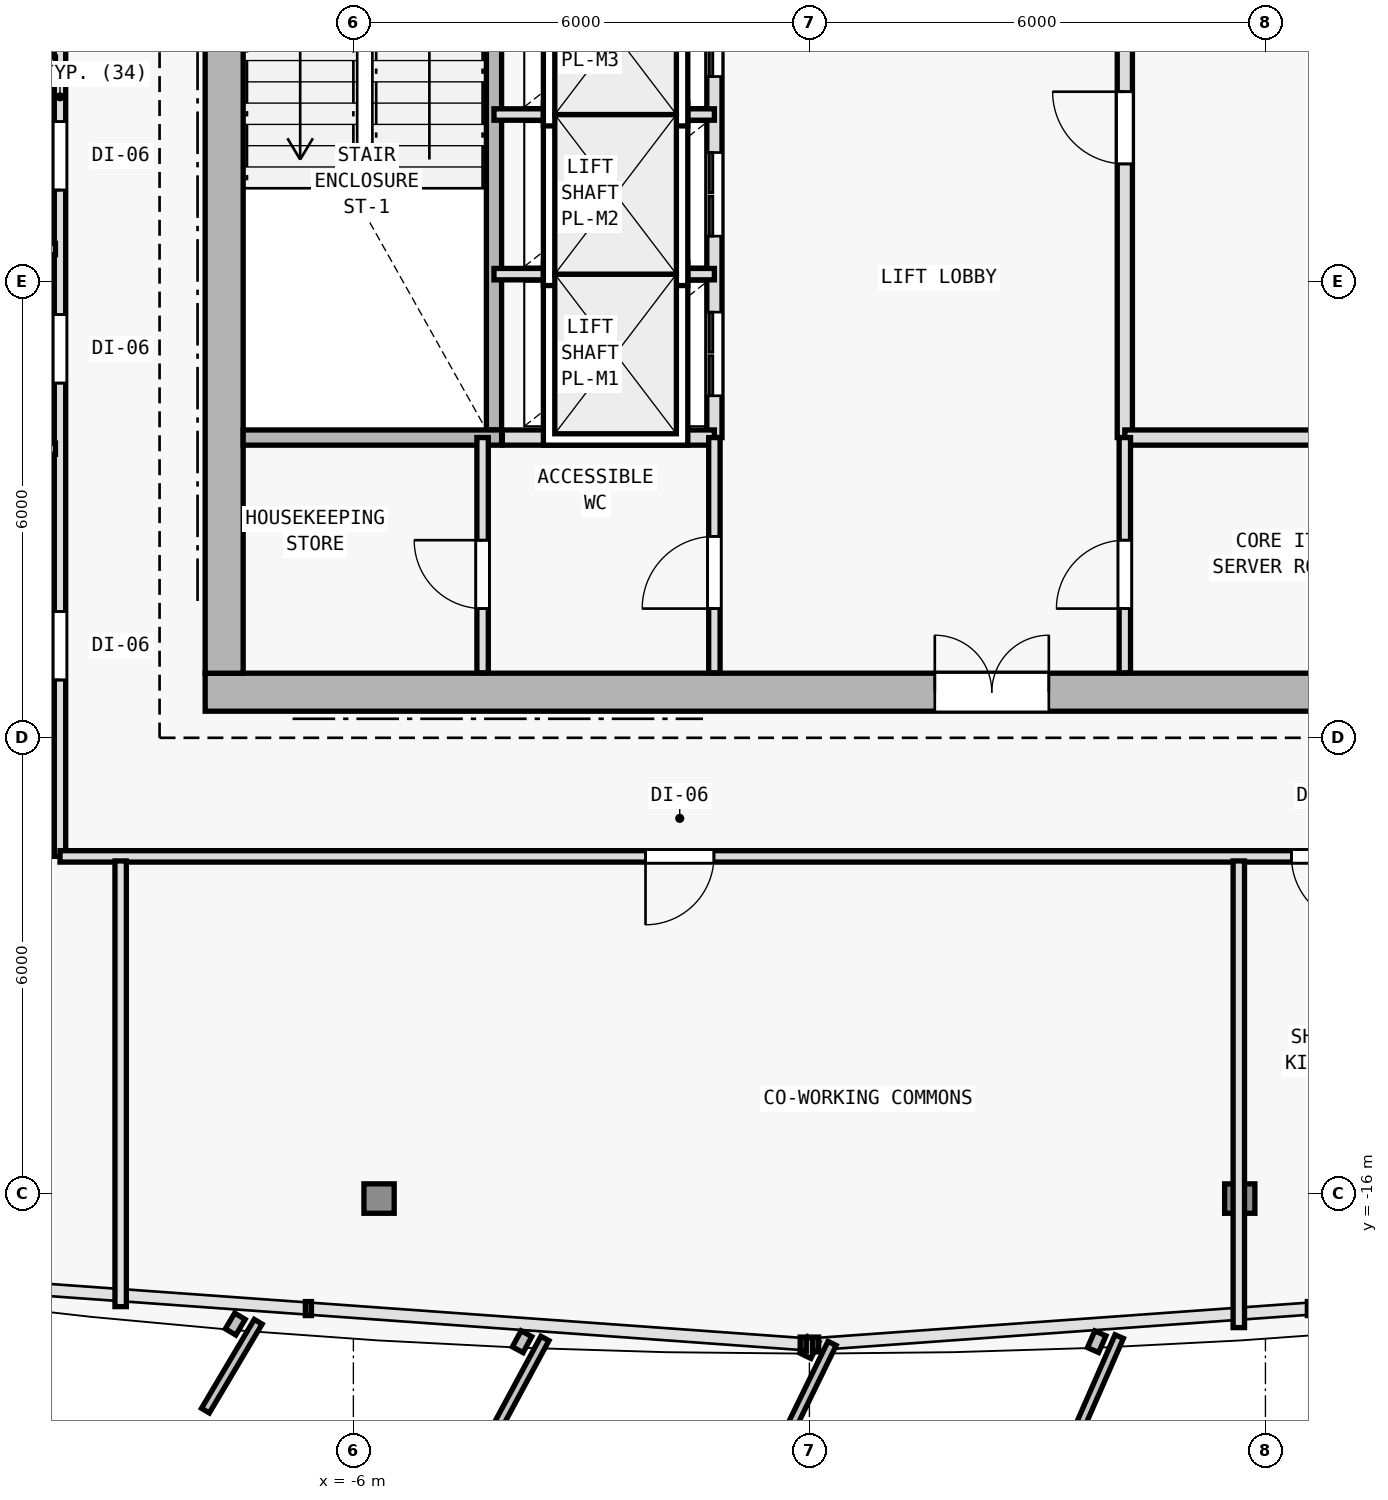
"""IFC4 building model, lengths in metres.
Left out: names, types, materials, properties, quantities, classifications, styles, units other than length and angle.
Written with IfcOpenShell. Run it as: python <this file> out.ifc"""

import sys

from ifc_helpers import new_model, si_unit, direction, frame, frame_2d, origin, origin_2d, place, context, subcontext, project, spatial, rectangle, i_section, extrude, element, fill, save


model = new_model("IFC4")
c1 = context("Model", 3, precision=1e-05, world=origin(), true_north=direction((0.0, 1.0)))
c2 = subcontext(c1, "Body", "Model", "MODEL_VIEW")
j1 = project(units=[si_unit("LENGTHUNIT", "METRE"), si_unit("PLANEANGLEUNIT", "RADIAN")], contexts=[c1])
p1 = place(None, origin())
s1 = spatial("IfcSite", under=j1, at=p1, CompositionType="ELEMENT")
p2 = place(p1, origin())
s2 = spatial("IfcBuilding", under=s1, at=p2, CompositionType="ELEMENT")
p3 = place(p2, frame((0.0, 0.0, 201.9)))
s3 = spatial("IfcBuildingStorey", under=s2, at=p3, CompositionType="ELEMENT", Elevation=201.9)
for number, where, z_axis, x_axis in (
    (1, (-7.7, -9.4, 0.0), (0.0, 0.0, 1.0), (1.0, 0.0, 0.0)),
    (2, (0.0, -9.4, 0.0), (0.0, 0.0, 1.0), (1.0, 0.0, 0.0)),
):
    element("IfcColumn", number, at=place(p3, frame(where, z_axis=z_axis, x_axis=x_axis)), inside=s3, PredefinedType="COLUMN", context=c2, shape_type="SweptSolid", body=[
        extrude(i_section(OverallWidth=0.398, OverallDepth=0.387, WebThickness=0.013, FlangeThickness=0.022, FilletRadius=0.015, at=origin_2d()), origin(), (0.0, 0.0, 1.0), 3.6),
    ])
for number, where, z_axis, x_axis in (
    (3, (-5.662, -16.062, 0.006), (0.007, 0.035, 0.999), (-0.981, 0.193, 0.0)),
    (4, (5.662, -16.062, 0.006), (-0.007, 0.035, 0.999), (-0.981, -0.193, 0.0)),
):
    element("IfcColumn", number, at=place(p3, frame(where, z_axis=z_axis, x_axis=x_axis)), inside=s3, PredefinedType="COLUMN", context=c2, shape_type="SweptSolid", body=[
        extrude(i_section(OverallWidth=0.398, OverallDepth=0.387, WebThickness=0.013, FlangeThickness=0.022, FilletRadius=0.015, at=origin_2d()), origin(), (0.0, 0.0, 1.0), 3.591),
    ])
p4 = place(p3, frame((-7.95, -9.4, 0.0), z_axis=(0.0, 0.0, 1.0), x_axis=(1.0, 0.0, 0.0)))
e5 = element("IfcWall", 5, at=p4, inside=s3, PredefinedType="SHEAR", context=c2, shape_type="SweptSolid", body=[
    extrude(rectangle(XDim=15.9, YDim=0.5, at=frame_2d((7.95, 0.0))), origin(), (0.0, 0.0, 1.0), 3.35),
])
p5 = place(p4, frame((9.6, 0.0, 0.0)))
e6 = element("IfcOpeningElement", 6, at=p5, cuts=e5, PredefinedType="OPENING", context=c2, shape_type="SweptSolid", body=[
    extrude(rectangle(XDim=1.5, YDim=2.2, at=frame_2d((0.75, 1.1))), frame((0.0, 0.26, 0.0), z_axis=(0.0, -1.0, 0.0), x_axis=(1.0, 0.0, 0.0)), (0.0, 0.0, 1.0), 0.52),
])
p6 = place(p3, frame((-7.7, -9.15, 0.0), z_axis=(0.0, 0.0, 1.0), x_axis=(0.0, 1.0, 0.0)))
e7 = element("IfcWall", 7, at=p6, inside=s3, PredefinedType="SHEAR", context=c2, shape_type="SweptSolid", body=[
    extrude(rectangle(XDim=19.1, YDim=0.5, at=frame_2d((9.55, 0.0))), origin(), (0.0, 0.0, 1.0), 3.35),
])
p7 = place(p6, frame((12.7, 0.0, 0.0)))
e8 = element("IfcOpeningElement", 8, at=p7, cuts=e7, PredefinedType="OPENING", context=c2, shape_type="SweptSolid", body=[
    extrude(rectangle(XDim=1.1, YDim=2.15, at=frame_2d((0.55, 1.075))), frame((0.0, 0.26, 0.0), z_axis=(0.0, -1.0, 0.0), x_axis=(1.0, 0.0, 0.0)), (0.0, 0.0, 1.0), 0.52),
])
p8 = place(p3, frame((-4.15, -5.95, 0.0), z_axis=(0.0, 0.0, 1.0), x_axis=(0.0, 1.0, 0.0)))
e9 = element("IfcWall", 9, at=p8, inside=s3, PredefinedType="SOLIDWALL", context=c2, shape_type="SweptSolid", body=[
    extrude(rectangle(XDim=7.2, YDim=0.2, at=frame_2d((3.6, 0.0))), origin(), (0.0, 0.0, 1.0), 3.35),
])
p9 = place(p3, frame((4.15, -6.05, 0.0), z_axis=(0.0, 0.0, 1.0), x_axis=(0.0, 1.0, 0.0)))
e10 = element("IfcWall", 10, at=p9, inside=s3, PredefinedType="SOLIDWALL", context=c2, shape_type="SweptSolid", body=[
    extrude(rectangle(XDim=8.7, YDim=0.2, at=frame_2d((4.35, 0.0))), origin(), (0.0, 0.0, 1.0), 3.35),
])
p10 = place(p9, frame((3.6, 0.0, 0.0)))
e11 = element("IfcOpeningElement", 11, at=p10, cuts=e10, PredefinedType="OPENING", context=c2, shape_type="SweptSolid", body=[
    extrude(rectangle(XDim=0.95, YDim=2.1, at=frame_2d((0.475, 1.05))), frame((0.0, 0.11, 0.0), z_axis=(0.0, -1.0, 0.0), x_axis=(1.0, 0.0, 0.0)), (0.0, 0.0, 1.0), 0.22),
])
p11 = place(p3, frame((-1.25, -6.05, 0.0), z_axis=(0.0, 0.0, 1.0), x_axis=(0.0, 1.0, 0.0)))
e12 = element("IfcWall", 12, at=p11, inside=s3, PredefinedType="SOLIDWALL", context=c2, shape_type="SweptSolid", body=[
    extrude(rectangle(XDim=8.7, YDim=0.2, at=frame_2d((4.35, 0.0))), origin(), (0.0, 0.0, 1.0), 3.35),
])
p12 = place(p11, frame((0.55, 0.0, 0.0)))
e13 = element("IfcOpeningElement", 13, at=p12, cuts=e12, PredefinedType="OPENING", context=c2, shape_type="SweptSolid", body=[
    extrude(rectangle(XDim=1.1, YDim=2.15, at=frame_2d((0.55, 1.075))), frame((0.0, 0.11, 0.0), z_axis=(0.0, -1.0, 0.0), x_axis=(1.0, 0.0, 0.0)), (0.0, 0.0, 1.0), 0.22),
])
p13 = place(p11, frame((2.65, 0.0, 0.0)))
e14 = element("IfcOpeningElement", 14, at=p13, cuts=e12, PredefinedType="OPENING", context=c2, shape_type="SweptSolid", body=[
    extrude(rectangle(XDim=1.1, YDim=2.15, at=frame_2d((0.55, 1.075))), frame((0.0, 0.11, 0.0), z_axis=(0.0, -1.0, 0.0), x_axis=(1.0, 0.0, 0.0)), (0.0, 0.0, 1.0), 0.22),
])
p14 = place(p11, frame((4.75, 0.0, 0.0)))
e15 = element("IfcOpeningElement", 15, at=p14, cuts=e12, PredefinedType="OPENING", context=c2, shape_type="SweptSolid", body=[
    extrude(rectangle(XDim=1.1, YDim=2.15, at=frame_2d((0.55, 1.075))), frame((0.0, 0.11, 0.0), z_axis=(0.0, -1.0, 0.0), x_axis=(1.0, 0.0, 0.0)), (0.0, 0.0, 1.0), 0.22),
])
p15 = place(p11, frame((6.85, 0.0, 0.0)))
e16 = element("IfcOpeningElement", 16, at=p15, cuts=e12, PredefinedType="OPENING", context=c2, shape_type="SweptSolid", body=[
    extrude(rectangle(XDim=1.1, YDim=2.15, at=frame_2d((0.55, 1.075))), frame((0.0, 0.11, 0.0), z_axis=(0.0, -1.0, 0.0), x_axis=(1.0, 0.0, 0.0)), (0.0, 0.0, 1.0), 0.22),
])
for number, where, z_axis, x_axis in (
    (17, (-4.15, -3.9, 0.0), (0.0, 0.0, 1.0), (1.0, 0.0, 0.0)),
    (18, (-4.15, -1.8, 0.0), (0.0, 0.0, 1.0), (1.0, 0.0, 0.0)),
):
    element("IfcWall", number, at=place(p3, frame(where, z_axis=z_axis, x_axis=x_axis)), inside=s3, PredefinedType="PARTITIONING", context=c2, shape_type="SweptSolid", body=[
        extrude(rectangle(XDim=2.9, YDim=0.15, at=frame_2d((1.45, 0.0))), origin(), (0.0, 0.0, 1.0), 3.35),
    ])
p16 = place(p3, frame((-7.45, -6.05, 0.0), z_axis=(0.0, 0.0, 1.0), x_axis=(1.0, 0.0, 0.0)))
e19 = element("IfcWall", 19, at=p16, inside=s3, PredefinedType="SOLIDWALL", context=c2, shape_type="SweptSolid", body=[
    extrude(rectangle(XDim=3.4, YDim=0.2, at=frame_2d((1.7, 0.0))), origin(), (0.0, 0.0, 1.0), 3.35),
])
p17 = place(p3, frame((-4.04, -6.05, 0.0), z_axis=(0.0, 0.0, 1.0), x_axis=(1.0, 0.0, 0.0)))
e20 = element("IfcWall", 20, at=p17, inside=s3, PredefinedType="SOLIDWALL", context=c2, shape_type="SweptSolid", body=[
    extrude(rectangle(XDim=2.79, YDim=0.2, at=frame_2d((1.395, 0.0))), origin(), (0.0, 0.0, 1.0), 3.35),
])
p18 = place(p3, frame((4.15, -6.05, 0.0), z_axis=(0.0, 0.0, 1.0), x_axis=(1.0, 0.0, 0.0)))
e21 = element("IfcWall", 21, at=p18, inside=s3, PredefinedType="SOLIDWALL", context=c2, shape_type="SweptSolid", body=[
    extrude(rectangle(XDim=3.295, YDim=0.2, at=frame_2d((1.647, 0.0))), origin(), (0.0, 0.0, 1.0), 3.35),
])
p19 = place(p3, frame((-1.25, -9.145, 0.0), z_axis=(0.0, 0.0, 1.0), x_axis=(0.0, 1.0, 0.0)))
e22 = element("IfcWall", 22, at=p19, inside=s3, PredefinedType="PARTITIONING", context=c2, shape_type="SweptSolid", body=[
    extrude(rectangle(XDim=3.095, YDim=0.15, at=frame_2d((1.547, 0.0))), origin(), (0.0, 0.0, 1.0), 3.35),
])
p20 = place(p19, frame((0.845, 0.0, 0.0)))
e23 = element("IfcOpeningElement", 23, at=p20, cuts=e22, PredefinedType="OPENING", context=c2, shape_type="SweptSolid", body=[
    extrude(rectangle(XDim=0.95, YDim=2.1, at=frame_2d((0.475, 1.05))), frame((0.0, 0.085, 0.0), z_axis=(0.0, -1.0, 0.0), x_axis=(1.0, 0.0, 0.0)), (0.0, 0.0, 1.0), 0.17),
])
p21 = place(p3, frame((4.15, -9.145, 0.0), z_axis=(0.0, 0.0, 1.0), x_axis=(0.0, 1.0, 0.0)))
e24 = element("IfcWall", 24, at=p21, inside=s3, PredefinedType="PARTITIONING", context=c2, shape_type="SweptSolid", body=[
    extrude(rectangle(XDim=3.095, YDim=0.15, at=frame_2d((1.547, 0.0))), origin(), (0.0, 0.0, 1.0), 3.35),
])
p22 = place(p21, frame((0.845, 0.0, 0.0)))
e25 = element("IfcOpeningElement", 25, at=p22, cuts=e24, PredefinedType="OPENING", context=c2, shape_type="SweptSolid", body=[
    extrude(rectangle(XDim=0.9, YDim=2.1, at=frame_2d((0.45, 1.05))), frame((0.0, 0.085, 0.0), z_axis=(0.0, -1.0, 0.0), x_axis=(1.0, 0.0, 0.0)), (0.0, 0.0, 1.0), 0.17),
])
p23 = place(p3, frame((-4.3, -9.145, 0.0), z_axis=(0.0, 0.0, 1.0), x_axis=(0.0, 1.0, 0.0)))
e26 = element("IfcWall", 26, at=p23, inside=s3, PredefinedType="PARTITIONING", context=c2, shape_type="SweptSolid", body=[
    extrude(rectangle(XDim=3.095, YDim=0.15, at=frame_2d((1.547, 0.0))), origin(), (0.0, 0.0, 1.0), 3.35),
])
p24 = place(p23, frame((0.845, 0.0, 0.0)))
e27 = element("IfcOpeningElement", 27, at=p24, cuts=e26, PredefinedType="OPENING", context=c2, shape_type="SweptSolid", body=[
    extrude(rectangle(XDim=0.9, YDim=2.1, at=frame_2d((0.45, 1.05))), frame((0.0, 0.085, 0.0), z_axis=(0.0, -1.0, 0.0), x_axis=(1.0, 0.0, 0.0)), (0.0, 0.0, 1.0), 0.17),
])
p25 = place(p3, frame((-9.86, -11.56, 0.0), z_axis=(0.0, 0.0, 1.0), x_axis=(0.0, 1.0, 0.0)))
e28 = element("IfcWall", 28, at=p25, inside=s3, PredefinedType="PARTITIONING", context=c2, shape_type="SweptSolid", body=[
    extrude(rectangle(XDim=19.986, YDim=0.15, at=frame_2d((9.993, 0.0))), origin(), (0.0, 0.0, 1.0), 2.775),
])
p26 = place(p25, frame((11.041, 0.0, 0.0)))
e29 = element("IfcOpeningElement", 29, at=p26, cuts=e28, PredefinedType="OPENING", context=c2, shape_type="SweptSolid", body=[
    extrude(rectangle(XDim=0.9, YDim=2.1, at=frame_2d((0.45, 1.05))), frame((0.0, 0.085, 0.0), z_axis=(0.0, -1.0, 0.0), x_axis=(1.0, 0.0, 0.0)), (0.0, 0.0, 1.0), 0.17),
])
p27 = place(p25, frame((8.766, 0.0, 0.0)))
e30 = element("IfcOpeningElement", 30, at=p27, cuts=e28, PredefinedType="OPENING", context=c2, shape_type="SweptSolid", body=[
    extrude(rectangle(XDim=0.9, YDim=2.1, at=frame_2d((0.45, 1.05))), frame((0.0, 0.085, 0.0), z_axis=(0.0, -1.0, 0.0), x_axis=(1.0, 0.0, 0.0)), (0.0, 0.0, 1.0), 0.17),
])
p28 = place(p25, frame((6.227, 0.0, 0.0)))
e31 = element("IfcOpeningElement", 31, at=p28, cuts=e28, PredefinedType="OPENING", context=c2, shape_type="SweptSolid", body=[
    extrude(rectangle(XDim=0.9, YDim=2.1, at=frame_2d((0.45, 1.05))), frame((0.0, 0.085, 0.0), z_axis=(0.0, -1.0, 0.0), x_axis=(1.0, 0.0, 0.0)), (0.0, 0.0, 1.0), 0.17),
])
p29 = place(p25, frame((2.321, 0.0, 0.0)))
e32 = element("IfcOpeningElement", 32, at=p29, cuts=e28, PredefinedType="OPENING", context=c2, shape_type="SweptSolid", body=[
    extrude(rectangle(XDim=0.9, YDim=2.1, at=frame_2d((0.45, 1.05))), frame((0.0, 0.085, 0.0), z_axis=(0.0, -1.0, 0.0), x_axis=(1.0, 0.0, 0.0)), (0.0, 0.0, 1.0), 0.17),
])
p30 = place(p25, frame((13.492, 0.0, 0.0)))
e33 = element("IfcOpeningElement", 33, at=p30, cuts=e28, PredefinedType="OPENING", context=c2, shape_type="SweptSolid", body=[
    extrude(rectangle(XDim=0.9, YDim=2.1, at=frame_2d((0.45, 1.05))), frame((0.0, 0.085, 0.0), z_axis=(0.0, -1.0, 0.0), x_axis=(1.0, 0.0, 0.0)), (0.0, 0.0, 1.0), 0.17),
])
p31 = place(p3, frame((13.18, -11.56, 0.0), z_axis=(0.0, 0.0, 1.0), x_axis=(-1.0, 0.0, 0.0)))
e34 = element("IfcWall", 34, at=p31, inside=s3, PredefinedType="PARTITIONING", context=c2, shape_type="SweptSolid", body=[
    extrude(rectangle(XDim=23.04, YDim=0.15, at=frame_2d((11.52, 0.0))), origin(), (0.0, 0.0, 1.0), 2.775),
])
p32 = place(p31, frame((14.436, 0.0, 0.0)))
e35 = element("IfcOpeningElement", 35, at=p32, cuts=e34, PredefinedType="OPENING", context=c2, shape_type="SweptSolid", body=[
    extrude(rectangle(XDim=0.9, YDim=2.1, at=frame_2d((0.45, 1.05))), frame((0.0, 0.085, 0.0), z_axis=(0.0, -1.0, 0.0), x_axis=(1.0, 0.0, 0.0)), (0.0, 0.0, 1.0), 0.17),
])
p33 = place(p31, frame((5.938, 0.0, 0.0)))
e36 = element("IfcOpeningElement", 36, at=p33, cuts=e34, PredefinedType="OPENING", context=c2, shape_type="SweptSolid", body=[
    extrude(rectangle(XDim=0.9, YDim=2.1, at=frame_2d((0.45, 1.05))), frame((0.0, 0.085, 0.0), z_axis=(0.0, -1.0, 0.0), x_axis=(1.0, 0.0, 0.0)), (0.0, 0.0, 1.0), 0.17),
])
p34 = place(p31, frame((3.458, 0.0, 0.0)))
e37 = element("IfcOpeningElement", 37, at=p34, cuts=e34, PredefinedType="OPENING", context=c2, shape_type="SweptSolid", body=[
    extrude(rectangle(XDim=0.9, YDim=2.1, at=frame_2d((0.45, 1.05))), frame((0.0, 0.085, 0.0), z_axis=(0.0, -1.0, 0.0), x_axis=(1.0, 0.0, 0.0)), (0.0, 0.0, 1.0), 0.17),
])
p35 = place(p31, frame((0.925, 0.0, 0.0)))
e38 = element("IfcOpeningElement", 38, at=p35, cuts=e34, PredefinedType="OPENING", context=c2, shape_type="SweptSolid", body=[
    extrude(rectangle(XDim=0.9, YDim=2.1, at=frame_2d((0.45, 1.05))), frame((0.0, 0.085, 0.0), z_axis=(0.0, -1.0, 0.0), x_axis=(1.0, 0.0, 0.0)), (0.0, 0.0, 1.0), 0.17),
])
p36 = place(p3, frame((5.65, -11.62, 0.0), z_axis=(0.0, 0.0, 1.0), x_axis=(0.0, -1.0, 0.0)))
e39 = element("IfcWall", 39, at=p36, inside=s3, PredefinedType="PARTITIONING", context=c2, shape_type="SweptSolid", body=[
    extrude(rectangle(XDim=6.139, YDim=0.15, at=frame_2d((3.07, 0.0))), origin(), (0.0, 0.0, 1.0), 2.775),
])
p37 = place(p3, frame((-9.92, -6.197, 0.0), z_axis=(0.0, 0.0, 1.0), x_axis=(-1.0, 0.0, 0.0)))
e40 = element("IfcWall", 40, at=p37, inside=s3, PredefinedType="PARTITIONING", context=c2, shape_type="SweptSolid", body=[
    extrude(rectangle(XDim=11.38, YDim=0.15, at=frame_2d((5.69, 0.0))), origin(), (0.0, 0.0, 1.0), 2.725),
])
p38 = place(p3, frame((-9.92, -1.118, 0.0), z_axis=(0.0, 0.0, 1.0), x_axis=(-1.0, 0.0, 0.0)))
e41 = element("IfcWall", 41, at=p38, inside=s3, PredefinedType="PARTITIONING", context=c2, shape_type="SweptSolid", body=[
    extrude(rectangle(XDim=7.925, YDim=0.15, at=frame_2d((3.963, 0.0))), origin(), (0.0, 0.0, 1.0), 2.725),
])
p39 = place(p3, frame((-9.92, -3.57, 0.0), z_axis=(0.0, 0.0, 1.0), x_axis=(-1.0, 0.0, 0.0)))
e42 = element("IfcWall", 42, at=p39, inside=s3, PredefinedType="PARTITIONING", context=c2, shape_type="SweptSolid", body=[
    extrude(rectangle(XDim=9.593, YDim=0.15, at=frame_2d((4.796, 0.0))), origin(), (0.0, 0.0, 1.0), 2.725),
])
p40 = place(p3, frame((-9.062, -11.62, 0.0), z_axis=(0.0, 0.0, 1.0), x_axis=(0.0, -1.0, 0.0)))
e43 = element("IfcWall", 43, at=p40, inside=s3, PredefinedType="PARTITIONING", context=c2, shape_type="SweptSolid", body=[
    extrude(rectangle(XDim=5.863, YDim=0.15, at=frame_2d((2.932, 0.0))), origin(), (0.0, 0.0, 1.0), 2.725),
])
p41 = place(p5, origin())
e44 = element("IfcDoor", 44, at=p41, inside=s3, OperationType="DOUBLE_DOOR_SINGLE_SWING", PredefinedType="DOOR", context=c2, shape_type="SweptSolid", body=[
    extrude(rectangle(XDim=1.5, YDim=2.2, at=frame_2d((0.75, 1.1))), frame((0.0, 0.025, 0.0), z_axis=(0.0, -1.0, 0.0), x_axis=(1.0, 0.0, 0.0)), (0.0, 0.0, 1.0), 0.05),
])
fill(e6, e44)
p42 = place(p10, origin())
e45 = element("IfcDoor", 45, at=p42, inside=s3, OperationType="SINGLE_SWING_RIGHT", PredefinedType="DOOR", context=c2, shape_type="SweptSolid", body=[
    extrude(rectangle(XDim=0.95, YDim=2.1, at=frame_2d((0.475, 1.05))), frame((0.0, 0.025, 0.0), z_axis=(0.0, -1.0, 0.0), x_axis=(1.0, 0.0, 0.0)), (0.0, 0.0, 1.0), 0.05),
])
fill(e11, e45)
p43 = place(p12, origin())
e46 = element("IfcDoor", 46, at=p43, inside=s3, OperationType="DOUBLE_DOOR_SLIDING", PredefinedType="DOOR", context=c2, shape_type="SweptSolid", body=[
    extrude(rectangle(XDim=1.1, YDim=2.15, at=frame_2d((0.55, 1.075))), frame((0.0, 0.025, 0.0), z_axis=(0.0, -1.0, 0.0), x_axis=(1.0, 0.0, 0.0)), (0.0, 0.0, 1.0), 0.05),
])
fill(e13, e46)
p44 = place(p13, origin())
e47 = element("IfcDoor", 47, at=p44, inside=s3, OperationType="DOUBLE_DOOR_SLIDING", PredefinedType="DOOR", context=c2, shape_type="SweptSolid", body=[
    extrude(rectangle(XDim=1.1, YDim=2.15, at=frame_2d((0.55, 1.075))), frame((0.0, 0.025, 0.0), z_axis=(0.0, -1.0, 0.0), x_axis=(1.0, 0.0, 0.0)), (0.0, 0.0, 1.0), 0.05),
])
fill(e14, e47)
p45 = place(p14, origin())
e48 = element("IfcDoor", 48, at=p45, inside=s3, OperationType="DOUBLE_DOOR_SLIDING", PredefinedType="DOOR", context=c2, shape_type="SweptSolid", body=[
    extrude(rectangle(XDim=1.1, YDim=2.15, at=frame_2d((0.55, 1.075))), frame((0.0, 0.025, 0.0), z_axis=(0.0, -1.0, 0.0), x_axis=(1.0, 0.0, 0.0)), (0.0, 0.0, 1.0), 0.05),
])
fill(e15, e48)
p46 = place(p20, origin())
e49 = element("IfcDoor", 49, at=p46, inside=s3, OperationType="SINGLE_SWING_LEFT", PredefinedType="DOOR", context=c2, shape_type="SweptSolid", body=[
    extrude(rectangle(XDim=0.95, YDim=2.1, at=frame_2d((0.475, 1.05))), frame((0.0, 0.025, 0.0), z_axis=(0.0, -1.0, 0.0), x_axis=(1.0, 0.0, 0.0)), (0.0, 0.0, 1.0), 0.05),
])
fill(e23, e49)
p47 = place(p24, origin())
e50 = element("IfcDoor", 50, at=p47, inside=s3, OperationType="SINGLE_SWING_RIGHT", PredefinedType="DOOR", context=c2, shape_type="SweptSolid", body=[
    extrude(rectangle(XDim=0.9, YDim=2.1, at=frame_2d((0.45, 1.05))), frame((0.0, 0.025, 0.0), z_axis=(0.0, -1.0, 0.0), x_axis=(1.0, 0.0, 0.0)), (0.0, 0.0, 1.0), 0.05),
])
fill(e27, e50)
p48 = place(p22, origin())
e51 = element("IfcDoor", 51, at=p48, inside=s3, OperationType="SINGLE_SWING_LEFT", PredefinedType="DOOR", context=c2, shape_type="SweptSolid", body=[
    extrude(rectangle(XDim=0.9, YDim=2.1, at=frame_2d((0.45, 1.05))), frame((0.0, 0.025, 0.0), z_axis=(0.0, -1.0, 0.0), x_axis=(1.0, 0.0, 0.0)), (0.0, 0.0, 1.0), 0.05),
])
fill(e25, e51)
p49 = place(p27, origin())
e52 = element("IfcDoor", 52, at=p49, inside=s3, OperationType="SINGLE_SWING_LEFT", PredefinedType="DOOR", context=c2, shape_type="SweptSolid", body=[
    extrude(rectangle(XDim=0.9, YDim=2.1, at=frame_2d((0.45, 1.05))), frame((0.0, 0.025, 0.0), z_axis=(0.0, -1.0, 0.0), x_axis=(1.0, 0.0, 0.0)), (0.0, 0.0, 1.0), 0.05),
])
fill(e30, e52)
p50 = place(p28, origin())
e53 = element("IfcDoor", 53, at=p50, inside=s3, OperationType="SINGLE_SWING_RIGHT", PredefinedType="DOOR", context=c2, shape_type="SweptSolid", body=[
    extrude(rectangle(XDim=0.9, YDim=2.1, at=frame_2d((0.45, 1.05))), frame((0.0, 0.025, 0.0), z_axis=(0.0, -1.0, 0.0), x_axis=(1.0, 0.0, 0.0)), (0.0, 0.0, 1.0), 0.05),
])
fill(e31, e53)
p51 = place(p29, origin())
e54 = element("IfcDoor", 54, at=p51, inside=s3, OperationType="SINGLE_SWING_LEFT", PredefinedType="DOOR", context=c2, shape_type="SweptSolid", body=[
    extrude(rectangle(XDim=0.9, YDim=2.1, at=frame_2d((0.45, 1.05))), frame((0.0, 0.025, 0.0), z_axis=(0.0, -1.0, 0.0), x_axis=(1.0, 0.0, 0.0)), (0.0, 0.0, 1.0), 0.05),
])
fill(e32, e54)
p52 = place(p32, origin())
e55 = element("IfcDoor", 55, at=p52, inside=s3, OperationType="SINGLE_SWING_RIGHT", PredefinedType="DOOR", context=c2, shape_type="SweptSolid", body=[
    extrude(rectangle(XDim=0.9, YDim=2.1, at=frame_2d((0.45, 1.05))), frame((0.0, 0.025, 0.0), z_axis=(0.0, -1.0, 0.0), x_axis=(1.0, 0.0, 0.0)), (0.0, 0.0, 1.0), 0.05),
])
fill(e35, e55)
p53 = place(p33, origin())
e56 = element("IfcDoor", 56, at=p53, inside=s3, OperationType="SINGLE_SWING_LEFT", PredefinedType="DOOR", context=c2, shape_type="SweptSolid", body=[
    extrude(rectangle(XDim=0.9, YDim=2.1, at=frame_2d((0.45, 1.05))), frame((0.0, 0.025, 0.0), z_axis=(0.0, -1.0, 0.0), x_axis=(1.0, 0.0, 0.0)), (0.0, 0.0, 1.0), 0.05),
])
fill(e36, e56)
save(model, sys.argv[1])
